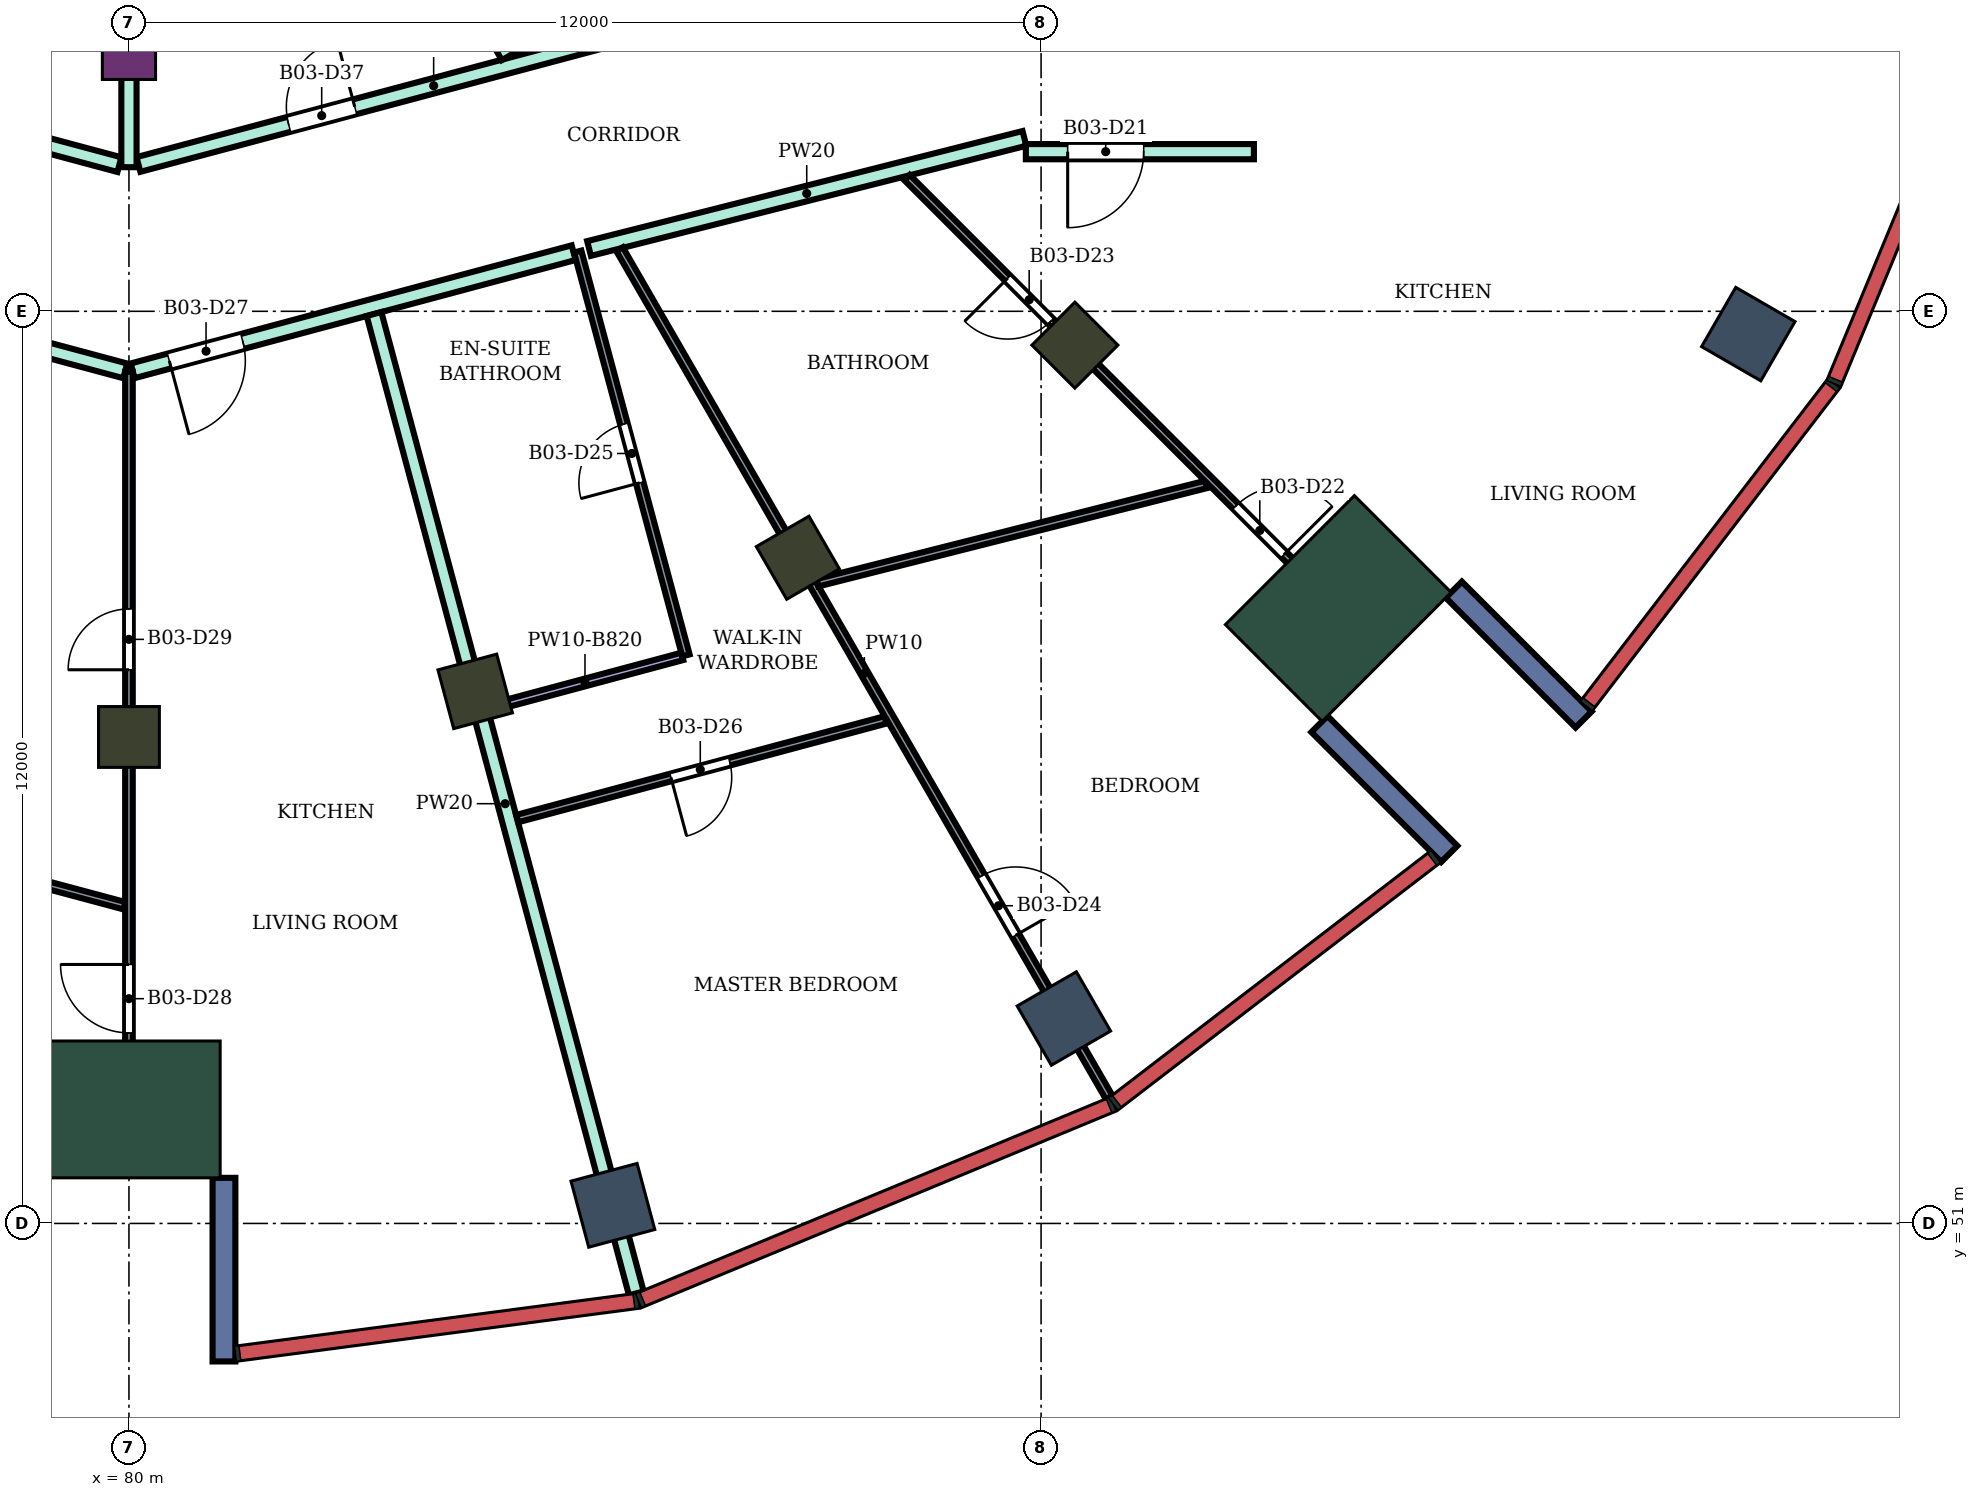
"""IFC4 building model, lengths in metres.
Left out: names, types, materials, properties, quantities, classifications, styles, units other than length and angle.
Written with IfcOpenShell. Run it as: python <this file> out.ifc"""

import sys

from ifc_helpers import new_model, si_unit, direction, frame, frame_2d, origin, origin_2d, place, context, subcontext, project, spatial, rectangle, extrude, element, fill, save


model = new_model("IFC4")
c1 = context("Model", 3, precision=1e-05, world=origin(), true_north=direction((0.0, 1.0)))
c2 = subcontext(c1, "Body", "Model", "MODEL_VIEW")
j1 = project(units=[si_unit("LENGTHUNIT", "METRE"), si_unit("PLANEANGLEUNIT", "RADIAN")], contexts=[c1])
p1 = place(None, origin())
s1 = spatial("IfcSite", under=j1, at=p1, CompositionType="ELEMENT")
p2 = place(p1, origin())
s2 = spatial("IfcBuilding", under=s1, at=p2, CompositionType="ELEMENT")
p3 = place(p2, frame((0.0, 0.0, 241.5)))
s3 = spatial("IfcBuildingStorey", under=s2, at=p3, CompositionType="ELEMENT", Elevation=241.5)
for number, where, z_axis, x_axis in (
    (1, (86.367, 51.238, 0.0), (0.0, 0.0, 1.0), (0.259, -0.966, 0.0)),
    (2, (92.3, 53.696, 0.0), (0.0, 0.0, 1.0), (0.5, -0.866, 0.0)),
    (3, (101.304, 62.7, 0.0), (0.0, 0.0, 1.0), (0.866, -0.5, 0.0)),
):
    element("IfcColumn", number, at=place(p3, frame(where, z_axis=z_axis, x_axis=x_axis)), inside=s3, PredefinedType="COLUMN", context=c2, shape_type="SweptSolid", body=[
        extrude(rectangle(XDim=0.9, YDim=0.9, at=origin_2d()), origin(), (0.0, 0.0, 1.0), 4.2),
    ])
for number, where, z_axis, x_axis in (
    (4, (80.0, 57.4, 0.0), (0.0, 0.0, 1.0), (0.0, -1.0, 0.0)),
    (5, (84.555, 58.0, 0.0), (0.0, 0.0, 1.0), (0.259, -0.966, 0.0)),
    (6, (88.8, 59.758, 0.0), (0.0, 0.0, 1.0), (0.5, -0.866, 0.0)),
    (7, (92.445, 62.555, 0.0), (0.0, 0.0, 1.0), (0.707, -0.707, 0.0)),
):
    element("IfcColumn", number, at=place(p3, frame(where, z_axis=z_axis, x_axis=x_axis)), inside=s3, PredefinedType="COLUMN", context=c2, shape_type="SweptSolid", body=[
        extrude(rectangle(XDim=0.8, YDim=0.8, at=origin_2d()), origin(), (0.0, 0.0, 1.0), 4.2),
    ])
p4 = place(p3, frame((80.0, 66.4, 0.0), z_axis=(0.0, 0.0, 1.0), x_axis=(0.0, -1.0, 0.0)))
e8 = element("IfcColumn", 8, at=p4, inside=s3, PredefinedType="COLUMN", context=c2, shape_type="SweptSolid", body=[
    extrude(rectangle(XDim=0.7, YDim=0.7, at=origin_2d()), origin(), (0.0, 0.0, 1.0), 4.2),
])
for number, where, z_axis, x_axis in (
    (9, (80.0, 52.5, 0.0), (0.0, 0.0, 1.0), (0.0, -1.0, 0.0)),
    (10, (95.91, 59.09, 0.0), (0.0, 0.0, 1.0), (0.707, -0.707, 0.0)),
):
    element("IfcColumn", number, at=place(p3, frame(where, z_axis=z_axis, x_axis=x_axis)), inside=s3, PredefinedType="COLUMN", context=c2, shape_type="SweptSolid", body=[
        extrude(rectangle(XDim=1.8, YDim=2.4, at=origin_2d()), origin(), (0.0, 0.0, 1.0), 4.2),
    ])
for number, where, z_axis, x_axis in (
    (11, (81.25, 51.6, 0.0), (0.0, 0.0, 1.0), (0.0, -1.0, 0.0)),
    (12, (95.662, 57.57, 0.0), (0.0, 0.0, 1.0), (0.707, -0.707, 0.0)),
    (13, (97.43, 59.338, 0.0), (0.0, 0.0, 1.0), (0.707, -0.707, 0.0)),
):
    element("IfcWall", number, at=place(p3, frame(where, z_axis=z_axis, x_axis=x_axis)), inside=s3, PredefinedType="NOTDEFINED", context=c2, shape_type="SweptSolid", body=[
        extrude(rectangle(XDim=2.416, YDim=0.3, at=frame_2d((1.208, 0.0))), origin(), (0.0, 0.0, 1.0), 4.2),
    ])
p5 = place(p3, frame((73.947, 63.826, 0.0), z_axis=(0.0, 0.0, 1.0), x_axis=(0.965908253407, -0.258884619088, 0.0)))
e14 = element("IfcWall", 14, at=p5, inside=s3, PredefinedType="PARTITIONING", context=c2, shape_type="SweptSolid", body=[
    extrude(rectangle(XDim=6.217, YDim=0.2, at=frame_2d((3.108, 0.0))), origin(), (0.0, 0.0, 1.0), 3.75),
])
p6 = place(p3, frame((74.603, 66.342, 0.0), z_axis=(0.0, 0.0, 1.0), x_axis=(0.965920893652, -0.258837453254, 0.0)))
e15 = element("IfcWall", 15, at=p6, inside=s3, PredefinedType="PARTITIONING", context=c2, shape_type="SweptSolid", body=[
    extrude(rectangle(XDim=5.458, YDim=0.2, at=frame_2d((2.729, 0.0))), origin(), (0.0, 0.0, 1.0), 3.75),
])
p7 = place(p6, frame((2.512, 0.0, 0.0)))
e16 = element("IfcOpeningElement", 16, at=p7, cuts=e15, PredefinedType="OPENING", context=c2, shape_type="SweptSolid", body=[
    extrude(rectangle(XDim=0.9, YDim=2.1, at=frame_2d((0.45, 1.05))), frame((0.0, 0.11, 0.0), z_axis=(0.0, -1.0, 0.0), x_axis=(1.0, 0.0, 0.0)), (0.0, 0.0, 1.0), 0.22),
])
p8 = place(p3, frame((80.125, 64.932, 0.0), z_axis=(0.0, 0.0, 1.0), x_axis=(0.966236955806, 0.257655089674, 0.0)))
e17 = element("IfcWall", 17, at=p8, inside=s3, PredefinedType="PARTITIONING", context=c2, shape_type="SweptSolid", body=[
    extrude(rectangle(XDim=8.039, YDim=0.2, at=frame_2d((4.02, 0.0))), origin(), (0.0, 0.0, 1.0), 3.75),
])
p9 = place(p8, frame((6.298, 0.0, 0.0)))
e18 = element("IfcOpeningElement", 18, at=p9, cuts=e17, PredefinedType="OPENING", context=c2, shape_type="SweptSolid", body=[
    extrude(rectangle(XDim=0.9, YDim=2.1, at=frame_2d((0.45, 1.05))), frame((0.0, 0.11, 0.0), z_axis=(0.0, -1.0, 0.0), x_axis=(1.0, 0.0, 0.0)), (0.0, 0.0, 1.0), 0.22),
])
p10 = place(p8, frame((2.045, 0.0, 0.0)))
e19 = element("IfcOpeningElement", 19, at=p10, cuts=e17, PredefinedType="OPENING", context=c2, shape_type="SweptSolid", body=[
    extrude(rectangle(XDim=0.9, YDim=2.1, at=frame_2d((0.45, 1.05))), frame((0.0, 0.11, 0.0), z_axis=(0.0, -1.0, 0.0), x_axis=(1.0, 0.0, 0.0)), (0.0, 0.0, 1.0), 0.22),
])
p11 = place(p3, frame((80.048, 62.217, 0.0), z_axis=(0.0, 0.0, 1.0), x_axis=(0.965941520544, 0.258760466242, 0.0)))
e20 = element("IfcWall", 20, at=p11, inside=s3, PredefinedType="PARTITIONING", context=c2, shape_type="SweptSolid", body=[
    extrude(rectangle(XDim=6.006, YDim=0.2, at=frame_2d((3.003, 0.0))), origin(), (0.0, 0.0, 1.0), 3.75),
])
p12 = place(p11, frame((0.5, 0.0, 0.0)))
e21 = element("IfcOpeningElement", 21, at=p12, cuts=e20, PredefinedType="OPENING", context=c2, shape_type="SweptSolid", body=[
    extrude(rectangle(XDim=1.0, YDim=2.1, at=frame_2d((0.5, 1.05))), frame((0.0, 0.11, 0.0), z_axis=(0.0, -1.0, 0.0), x_axis=(1.0, 0.0, 0.0)), (0.0, 0.0, 1.0), 0.22),
])
p13 = place(p3, frame((80.0, 64.896, 0.0), z_axis=(0.0, 0.0, 1.0), x_axis=(0.0, 1.0, 0.0)))
e22 = element("IfcWall", 22, at=p13, inside=s3, PredefinedType="PARTITIONING", context=c2, shape_type="SweptSolid", body=[
    extrude(rectangle(XDim=2.405, YDim=0.2, at=frame_2d((1.203, 0.0))), origin(), (0.0, 0.0, 1.0), 3.75),
])
p14 = place(p3, frame((83.224, 62.964, 0.0), z_axis=(0.0, 0.0, 1.0), x_axis=(0.258742489642, -0.965946336012, 0.0)))
e23 = element("IfcWall", 23, at=p14, inside=s3, PredefinedType="PARTITIONING", context=c2, shape_type="SweptSolid", body=[
    extrude(rectangle(XDim=13.338, YDim=0.2, at=frame_2d((6.669, 0.0))), origin(), (0.0, 0.0, 1.0), 3.75),
])
p15 = place(p3, frame((83.85, 68.333, 0.0), z_axis=(0.0, 0.0, 1.0), x_axis=(0.500080019051, -0.865979199835, 0.0)))
e24 = element("IfcWall", 24, at=p15, inside=s3, PredefinedType="PARTITIONING", context=c2, shape_type="SweptSolid", body=[
    extrude(rectangle(XDim=2.285, YDim=0.2, at=frame_2d((1.143, 0.0))), origin(), (0.0, 0.0, 1.0), 3.75),
])
p16 = place(p3, frame((86.053, 63.826, 0.0), z_axis=(0.0, 0.0, 1.0), x_axis=(0.969490004987, 0.245130843083, 0.0)))
e25 = element("IfcWall", 25, at=p16, inside=s3, PredefinedType="PARTITIONING", context=c2, shape_type="SweptSolid", body=[
    extrude(rectangle(XDim=5.908, YDim=0.2, at=frame_2d((2.954, 0.0))), origin(), (0.0, 0.0, 1.0), 3.75),
])
p17 = place(p3, frame((91.8, 65.1, 0.0), z_axis=(0.0, 0.0, 1.0), x_axis=(1.0, 0.0, 0.0)))
e26 = element("IfcWall", 26, at=p17, inside=s3, PredefinedType="PARTITIONING", context=c2, shape_type="SweptSolid", body=[
    extrude(rectangle(XDim=3.0, YDim=0.2, at=frame_2d((1.5, 0.0))), origin(), (0.0, 0.0, 1.0), 3.75),
])
p18 = place(p17, frame((0.55, 0.0, 0.0)))
e27 = element("IfcOpeningElement", 27, at=p18, cuts=e26, PredefinedType="OPENING", context=c2, shape_type="SweptSolid", body=[
    extrude(rectangle(XDim=1.0, YDim=2.1, at=frame_2d((0.5, 1.05))), frame((0.0, 0.11, 0.0), z_axis=(0.0, -1.0, 0.0), x_axis=(1.0, 0.0, 0.0)), (0.0, 0.0, 1.0), 0.22),
])
p19 = place(p3, frame((70.188, 57.793, 0.0), z_axis=(0.0, 0.0, 1.0), x_axis=(0.965911138035, -0.258873856194, 0.0)))
e28 = element("IfcWall", 28, at=p19, inside=s3, PredefinedType="PARTITIONING", context=c2, shape_type="SweptSolid", body=[
    extrude(rectangle(XDim=10.098, YDim=0.1, at=frame_2d((5.049, 0.0))), origin(), (0.0, 0.0, 1.0), 3.75),
])
p20 = place(p19, frame((2.057, 0.0, 0.0)))
e29 = element("IfcOpeningElement", 29, at=p20, cuts=e28, PredefinedType="OPENING", context=c2, shape_type="SweptSolid", body=[
    extrude(rectangle(XDim=0.8, YDim=2.1, at=frame_2d((0.4, 1.05))), frame((0.0, 0.06, 0.0), z_axis=(0.0, -1.0, 0.0), x_axis=(1.0, 0.0, 0.0)), (0.0, 0.0, 1.0), 0.12),
])
p21 = place(p3, frame((80.0, 51.8, 0.0), z_axis=(0.0, 0.0, 1.0), x_axis=(0.0, 1.0, 0.0)))
e30 = element("IfcWall", 30, at=p21, inside=s3, PredefinedType="PARTITIONING", context=c2, shape_type="SweptSolid", body=[
    extrude(rectangle(XDim=10.404, YDim=0.1, at=frame_2d((5.202, 0.0))), origin(), (0.0, 0.0, 1.0), 3.75),
])
p22 = place(p21, frame((1.707, 0.0, 0.0)))
e31 = element("IfcOpeningElement", 31, at=p22, cuts=e30, PredefinedType="OPENING", context=c2, shape_type="SweptSolid", body=[
    extrude(rectangle(XDim=0.9, YDim=2.1, at=frame_2d((0.45, 1.05))), frame((0.0, 0.06, 0.0), z_axis=(0.0, -1.0, 0.0), x_axis=(1.0, 0.0, 0.0)), (0.0, 0.0, 1.0), 0.12),
])
p23 = place(p21, frame((6.484, 0.0, 0.0)))
e32 = element("IfcOpeningElement", 32, at=p23, cuts=e30, PredefinedType="OPENING", context=c2, shape_type="SweptSolid", body=[
    extrude(rectangle(XDim=0.8, YDim=2.1, at=frame_2d((0.4, 1.05))), frame((0.0, 0.06, 0.0), z_axis=(0.0, -1.0, 0.0), x_axis=(1.0, 0.0, 0.0)), (0.0, 0.0, 1.0), 0.12),
])
p24 = place(p3, frame((84.719, 57.774, 0.0), z_axis=(0.0, 0.0, 1.0), x_axis=(0.965902408875, 0.258906424273, 0.0)))
e33 = element("IfcWall", 33, at=p24, inside=s3, PredefinedType="PARTITIONING", context=c2, shape_type="SweptSolid", body=[
    extrude(rectangle(XDim=2.651, YDim=0.1, at=frame_2d((1.325, 0.0))), origin(), (0.0, 0.0, 1.0), 3.38),
])
p25 = place(p3, frame((85.108, 56.326, 0.0), z_axis=(0.0, 0.0, 1.0), x_axis=(0.965911122806, 0.258873913014, 0.0)))
e34 = element("IfcWall", 34, at=p25, inside=s3, PredefinedType="PARTITIONING", context=c2, shape_type="SweptSolid", body=[
    extrude(rectangle(XDim=5.017, YDim=0.1, at=frame_2d((2.509, 0.0))), origin(), (0.0, 0.0, 1.0), 3.75),
])
p26 = place(p25, frame((2.094, 0.0, 0.0)))
e35 = element("IfcOpeningElement", 35, at=p26, cuts=e34, PredefinedType="OPENING", context=c2, shape_type="SweptSolid", body=[
    extrude(rectangle(XDim=0.8, YDim=2.1, at=frame_2d((0.4, 1.05))), frame((0.0, 0.06, 0.0), z_axis=(0.0, -1.0, 0.0), x_axis=(1.0, 0.0, 0.0)), (0.0, 0.0, 1.0), 0.12),
])
p27 = place(p3, frame((85.904, 63.786, 0.0), z_axis=(0.0, 0.0, 1.0), x_axis=(0.258855888267, -0.96591595344, 0.0)))
e36 = element("IfcWall", 36, at=p27, inside=s3, PredefinedType="PARTITIONING", context=c2, shape_type="SweptSolid", body=[
    extrude(rectangle(XDim=5.5, YDim=0.1, at=frame_2d((2.75, 0.0))), origin(), (0.0, 0.0, 1.0), 3.75),
])
p28 = place(p27, frame((2.35, 0.0, 0.0)))
e37 = element("IfcOpeningElement", 37, at=p28, cuts=e36, PredefinedType="OPENING", context=c2, shape_type="SweptSolid", body=[
    extrude(rectangle(XDim=0.8, YDim=2.1, at=frame_2d((0.4, 1.05))), frame((0.0, 0.06, 0.0), z_axis=(0.0, -1.0, 0.0), x_axis=(1.0, 0.0, 0.0)), (0.0, 0.0, 1.0), 0.12),
])
p29 = place(p3, frame((86.454, 63.818, 0.0), z_axis=(0.0, 0.0, 1.0), x_axis=(0.499914882008, -0.866074541103, 0.0)))
e38 = element("IfcWall", 38, at=p29, inside=s3, PredefinedType="PARTITIONING", context=c2, shape_type="SweptSolid", body=[
    extrude(rectangle(XDim=12.886, YDim=0.1, at=frame_2d((6.443, 0.0))), origin(), (0.0, 0.0, 1.0), 3.75),
])
p30 = place(p29, frame((9.524, 0.0, 0.0)))
e39 = element("IfcOpeningElement", 39, at=p30, cuts=e38, PredefinedType="OPENING", context=c2, shape_type="SweptSolid", body=[
    extrude(rectangle(XDim=0.9, YDim=2.1, at=frame_2d((0.45, 1.05))), frame((0.0, 0.06, 0.0), z_axis=(0.0, -1.0, 0.0), x_axis=(1.0, 0.0, 0.0)), (0.0, 0.0, 1.0), 0.12),
])
p31 = place(p3, frame((89.058, 59.429, 0.0), z_axis=(0.0, 0.0, 1.0), x_axis=(0.96946321375, 0.2452367778, 0.0)))
e40 = element("IfcWall", 40, at=p31, inside=s3, PredefinedType="PARTITIONING", context=c2, shape_type="SweptSolid", body=[
    extrude(rectangle(XDim=5.272, YDim=0.1, at=frame_2d((2.636, 0.0))), origin(), (0.0, 0.0, 1.0), 3.75),
])
p32 = place(p3, frame((90.237, 64.759, 0.0), z_axis=(0.0, 0.0, 1.0), x_axis=(0.706952774706, -0.707260754132, 0.0)))
e41 = element("IfcWall", 41, at=p32, inside=s3, PredefinedType="PARTITIONING", context=c2, shape_type="SweptSolid", body=[
    extrude(rectangle(XDim=8.72, YDim=0.1, at=frame_2d((4.36, 0.0))), origin(), (0.0, 0.0, 1.0), 3.75),
])
p33 = place(p32, frame((6.114, 0.0, 0.0)))
e42 = element("IfcOpeningElement", 42, at=p33, cuts=e41, PredefinedType="OPENING", context=c2, shape_type="SweptSolid", body=[
    extrude(rectangle(XDim=0.9, YDim=2.1, at=frame_2d((0.45, 1.05))), frame((0.0, 0.06, 0.0), z_axis=(0.0, -1.0, 0.0), x_axis=(1.0, 0.0, 0.0)), (0.0, 0.0, 1.0), 0.12),
])
p34 = place(p32, frame((1.872, 0.0, 0.0)))
e43 = element("IfcOpeningElement", 43, at=p34, cuts=e41, PredefinedType="OPENING", context=c2, shape_type="SweptSolid", body=[
    extrude(rectangle(XDim=0.8, YDim=2.1, at=frame_2d((0.4, 1.05))), frame((0.0, 0.06, 0.0), z_axis=(0.0, -1.0, 0.0), x_axis=(1.0, 0.0, 0.0)), (0.0, 0.0, 1.0), 0.12),
])
p35 = place(p18, frame((1.0, 0.0, 0.0), z_axis=(0.0, 0.0, 1.0), x_axis=(-1.0, 0.0, 0.0)))
e44 = element("IfcDoor", 44, at=p35, inside=s3, OperationType="SINGLE_SWING_RIGHT", PredefinedType="DOOR", context=c2, shape_type="SweptSolid", body=[
    extrude(rectangle(XDim=1.0, YDim=2.1, at=frame_2d((0.5, 1.05))), frame((0.0, 0.025, 0.0), z_axis=(0.0, -1.0, 0.0), x_axis=(1.0, 0.0, 0.0)), (0.0, 0.0, 1.0), 0.05),
])
fill(e27, e44)
p36 = place(p33, origin())
e45 = element("IfcDoor", 45, at=p36, inside=s3, OperationType="SINGLE_SWING_RIGHT", PredefinedType="DOOR", context=c2, shape_type="SweptSolid", body=[
    extrude(rectangle(XDim=0.9, YDim=2.1, at=frame_2d((0.45, 1.05))), frame((0.0, 0.025, 0.0), z_axis=(0.0, -1.0, 0.0), x_axis=(1.0, 0.0, 0.0)), (0.0, 0.0, 1.0), 0.05),
])
fill(e42, e45)
p37 = place(p34, frame((0.8, 0.0, 0.0), z_axis=(0.0, 0.0, 1.0), x_axis=(-1.0, 0.0, 0.0)))
e46 = element("IfcDoor", 46, at=p37, inside=s3, OperationType="SINGLE_SWING_RIGHT", PredefinedType="DOOR", context=c2, shape_type="SweptSolid", body=[
    extrude(rectangle(XDim=0.8, YDim=2.1, at=frame_2d((0.4, 1.05))), frame((0.0, 0.025, 0.0), z_axis=(0.0, -1.0, 0.0), x_axis=(1.0, 0.0, 0.0)), (0.0, 0.0, 1.0), 0.05),
])
fill(e43, e46)
p38 = place(p30, origin())
e47 = element("IfcDoor", 47, at=p38, inside=s3, OperationType="SINGLE_SWING_RIGHT", PredefinedType="DOOR", context=c2, shape_type="SweptSolid", body=[
    extrude(rectangle(XDim=0.9, YDim=2.1, at=frame_2d((0.45, 1.05))), frame((0.0, 0.025, 0.0), z_axis=(0.0, -1.0, 0.0), x_axis=(1.0, 0.0, 0.0)), (0.0, 0.0, 1.0), 0.05),
])
fill(e39, e47)
p39 = place(p28, frame((0.8, 0.0, 0.0), z_axis=(0.0, 0.0, 1.0), x_axis=(-1.0, 0.0, 0.0)))
e48 = element("IfcDoor", 48, at=p39, inside=s3, OperationType="SINGLE_SWING_LEFT", PredefinedType="DOOR", context=c2, shape_type="SweptSolid", body=[
    extrude(rectangle(XDim=0.8, YDim=2.1, at=frame_2d((0.4, 1.05))), frame((0.0, 0.025, 0.0), z_axis=(0.0, -1.0, 0.0), x_axis=(1.0, 0.0, 0.0)), (0.0, 0.0, 1.0), 0.05),
])
fill(e37, e48)
p40 = place(p26, frame((0.8, 0.0, 0.0), z_axis=(0.0, 0.0, 1.0), x_axis=(-1.0, 0.0, 0.0)))
e49 = element("IfcDoor", 49, at=p40, inside=s3, OperationType="SINGLE_SWING_RIGHT", PredefinedType="DOOR", context=c2, shape_type="SweptSolid", body=[
    extrude(rectangle(XDim=0.8, YDim=2.1, at=frame_2d((0.4, 1.05))), frame((0.0, 0.025, 0.0), z_axis=(0.0, -1.0, 0.0), x_axis=(1.0, 0.0, 0.0)), (0.0, 0.0, 1.0), 0.05),
])
fill(e35, e49)
p41 = place(p12, frame((1.0, 0.0, 0.0), z_axis=(0.0, 0.0, 1.0), x_axis=(-1.0, 0.0, 0.0)))
e50 = element("IfcDoor", 50, at=p41, inside=s3, OperationType="SINGLE_SWING_RIGHT", PredefinedType="DOOR", context=c2, shape_type="SweptSolid", body=[
    extrude(rectangle(XDim=1.0, YDim=2.1, at=frame_2d((0.5, 1.05))), frame((0.0, 0.025, 0.0), z_axis=(0.0, -1.0, 0.0), x_axis=(1.0, 0.0, 0.0)), (0.0, 0.0, 1.0), 0.05),
])
fill(e21, e50)
p42 = place(p22, origin())
e51 = element("IfcDoor", 51, at=p42, inside=s3, OperationType="SINGLE_SWING_RIGHT", PredefinedType="DOOR", context=c2, shape_type="SweptSolid", body=[
    extrude(rectangle(XDim=0.9, YDim=2.1, at=frame_2d((0.45, 1.05))), frame((0.0, 0.025, 0.0), z_axis=(0.0, -1.0, 0.0), x_axis=(1.0, 0.0, 0.0)), (0.0, 0.0, 1.0), 0.05),
])
fill(e31, e51)
p43 = place(p23, origin())
e52 = element("IfcDoor", 52, at=p43, inside=s3, OperationType="SINGLE_SWING_LEFT", PredefinedType="DOOR", context=c2, shape_type="SweptSolid", body=[
    extrude(rectangle(XDim=0.8, YDim=2.1, at=frame_2d((0.4, 1.05))), frame((0.0, 0.025, 0.0), z_axis=(0.0, -1.0, 0.0), x_axis=(1.0, 0.0, 0.0)), (0.0, 0.0, 1.0), 0.05),
])
fill(e32, e52)
p44 = place(p10, origin())
e53 = element("IfcDoor", 53, at=p44, inside=s3, OperationType="SINGLE_SWING_RIGHT", PredefinedType="DOOR", context=c2, shape_type="SweptSolid", body=[
    extrude(rectangle(XDim=0.9, YDim=2.1, at=frame_2d((0.45, 1.05))), frame((0.0, 0.025, 0.0), z_axis=(0.0, -1.0, 0.0), x_axis=(1.0, 0.0, 0.0)), (0.0, 0.0, 1.0), 0.05),
])
fill(e19, e53)
save(model, sys.argv[1])
